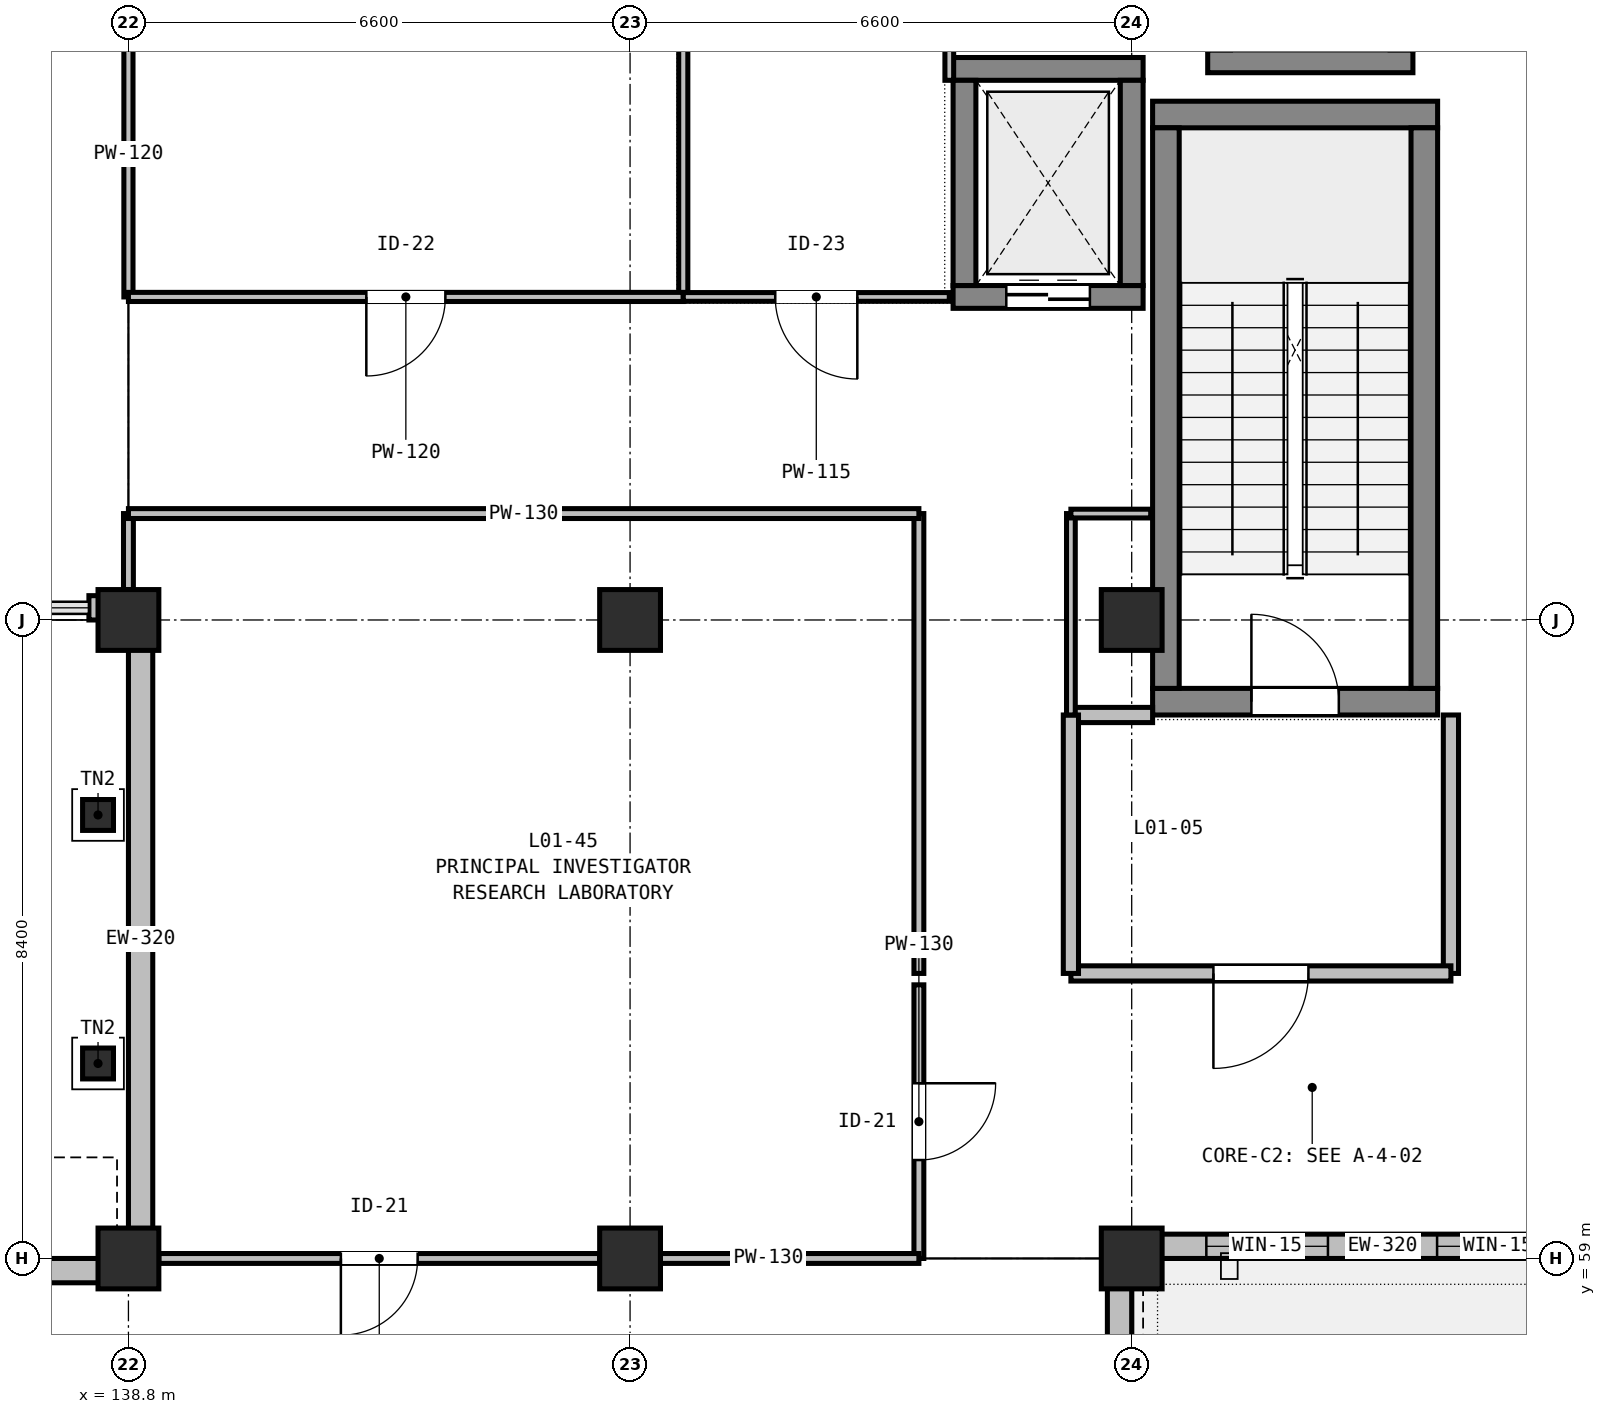
"""IFC4 building model, lengths in metres.
Left out: names, types, materials, properties, quantities, classifications, styles, units other than length and angle.
Written with IfcOpenShell. Run it as: python <this file> out.ifc"""

import sys

from ifc_helpers import new_model, si_unit, direction, frame, frame_2d, origin, origin_2d, place, context, subcontext, project, spatial, rectangle, hollow_circle, extrude, element, fill, save


model = new_model("IFC4")
c1 = context("Model", 3, precision=1e-05, world=origin(), true_north=direction((0.0, 1.0)))
c2 = subcontext(c1, "Body", "Model", "MODEL_VIEW")
j1 = project(units=[si_unit("LENGTHUNIT", "METRE"), si_unit("PLANEANGLEUNIT", "RADIAN")], contexts=[c1])
p1 = place(None, origin())
s1 = spatial("IfcSite", under=j1, at=p1, CompositionType="ELEMENT")
p2 = place(p1, origin())
s2 = spatial("IfcBuilding", under=s1, at=p2, CompositionType="ELEMENT")
p3 = place(p2, frame((0.0, 0.0, 5.4)))
s3 = spatial("IfcBuildingStorey", under=s2, at=p3, CompositionType="ELEMENT", Elevation=5.4)
for number, where, z_axis, x_axis in (
    (1, (138.8, 59.0, 0.0), (0.0, 0.0, 1.0), (1.0, 0.0, 0.0)),
    (2, (138.8, 67.4, 0.0), (0.0, 0.0, 1.0), (1.0, 0.0, 0.0)),
    (3, (145.4, 59.0, 0.0), (0.0, 0.0, 1.0), (1.0, 0.0, 0.0)),
    (4, (145.4, 67.4, 0.0), (0.0, 0.0, 1.0), (1.0, 0.0, 0.0)),
    (5, (152.0, 59.0, 0.0), (0.0, 0.0, 1.0), (1.0, 0.0, 0.0)),
    (6, (152.0, 67.4, 0.0), (0.0, 0.0, 1.0), (1.0, 0.0, 0.0)),
):
    element("IfcColumn", number, at=place(p3, frame(where, z_axis=z_axis, x_axis=x_axis)), inside=s3, PredefinedType="COLUMN", context=c2, shape_type="SweptSolid", body=[
        extrude(rectangle(XDim=0.8, YDim=0.8, at=origin_2d()), origin(), (0.0, 0.0, 1.0), 4.8),
    ])
p4 = place(p3, frame((152.275, 66.325, 0.0), z_axis=(0.0, 0.0, 1.0), x_axis=(1.0, 0.0, 0.0)))
e7 = element("IfcWall", 7, at=p4, inside=s3, PredefinedType="SHEAR", context=c2, shape_type="SweptSolid", body=[
    extrude(rectangle(XDim=3.75, YDim=0.35, at=frame_2d((1.875, 0.0))), origin(), (0.0, 0.0, 1.0), 4.8),
])
p5 = place(p4, frame((1.3, 0.0, 0.0)))
e8 = element("IfcOpeningElement", 8, at=p5, cuts=e7, PredefinedType="OPENING", context=c2, shape_type="SweptSolid", body=[
    extrude(rectangle(XDim=1.15, YDim=2.15, at=frame_2d((0.575, 1.075))), frame((0.0, 0.185, 0.0), z_axis=(0.0, -1.0, 0.0), x_axis=(1.0, 0.0, 0.0)), (0.0, 0.0, 1.0), 0.37),
])
p6 = place(p3, frame((152.275, 74.05, 0.0), z_axis=(0.0, 0.0, 1.0), x_axis=(1.0, 0.0, 0.0)))
e9 = element("IfcWall", 9, at=p6, inside=s3, PredefinedType="SHEAR", context=c2, shape_type="SweptSolid", body=[
    extrude(rectangle(XDim=3.75, YDim=0.35, at=frame_2d((1.875, 0.0))), origin(), (0.0, 0.0, 1.0), 4.8),
])
for number, where, z_axis, x_axis in (
    (10, (152.45, 66.5, 0.0), (0.0, 0.0, 1.0), (0.0, 1.0, 0.0)),
    (11, (155.85, 66.5, 0.0), (0.0, 0.0, 1.0), (0.0, 1.0, 0.0)),
):
    element("IfcWall", number, at=place(p3, frame(where, z_axis=z_axis, x_axis=x_axis)), inside=s3, PredefinedType="SHEAR", context=c2, shape_type="SweptSolid", body=[
        extrude(rectangle(XDim=7.375, YDim=0.35, at=frame_2d((3.688, 0.0))), origin(), (0.0, 0.0, 1.0), 4.8),
    ])
p7 = place(p3, frame((149.65, 71.65, 0.0), z_axis=(0.0, 0.0, 1.0), x_axis=(1.0, 0.0, 0.0)))
e12 = element("IfcWall", 12, at=p7, inside=s3, PredefinedType="SHEAR", context=c2, shape_type="SweptSolid", body=[
    extrude(rectangle(XDim=2.5, YDim=0.3, at=frame_2d((1.25, 0.0))), origin(), (0.0, 0.0, 1.0), 4.8),
])
p8 = place(p7, frame((0.7, 0.0, 0.0)))
e13 = element("IfcOpeningElement", 13, at=p8, cuts=e12, PredefinedType="OPENING", context=c2, shape_type="SweptSolid", body=[
    extrude(rectangle(XDim=1.1, YDim=2.1, at=frame_2d((0.55, 1.05))), frame((0.0, 0.16, 0.0), z_axis=(0.0, -1.0, 0.0), x_axis=(1.0, 0.0, 0.0)), (0.0, 0.0, 1.0), 0.32),
])
p9 = place(p3, frame((149.65, 74.65, 0.0), z_axis=(0.0, 0.0, 1.0), x_axis=(1.0, 0.0, 0.0)))
e14 = element("IfcWall", 14, at=p9, inside=s3, PredefinedType="SHEAR", context=c2, shape_type="SweptSolid", body=[
    extrude(rectangle(XDim=2.5, YDim=0.3, at=frame_2d((1.25, 0.0))), origin(), (0.0, 0.0, 1.0), 4.8),
])
for number, where, z_axis, x_axis in (
    (15, (149.8, 71.8, 0.0), (0.0, 0.0, 1.0), (0.0, 1.0, 0.0)),
    (16, (152.0, 71.8, 0.0), (0.0, 0.0, 1.0), (0.0, 1.0, 0.0)),
    (17, (153.0, 74.75, 0.0), (0.0, 0.0, 1.0), (1.0, 0.0, 0.0)),
):
    element("IfcWall", number, at=place(p3, frame(where, z_axis=z_axis, x_axis=x_axis)), inside=s3, PredefinedType="SHEAR", context=c2, shape_type="SweptSolid", body=[
        extrude(rectangle(XDim=2.7, YDim=0.3, at=frame_2d((1.35, 0.0))), origin(), (0.0, 0.0, 1.0), 4.8),
    ])
for number, where, z_axis, x_axis in (
    (18, (138.4, 61.565, 0.0), (0.0, 0.0, 1.0), (1.0, 0.0, 0.0)),
    (19, (138.4, 64.835, 0.0), (0.0, 0.0, 1.0), (1.0, 0.0, 0.0)),
):
    element("IfcColumn", number, at=place(p3, frame(where, z_axis=z_axis, x_axis=x_axis)), inside=s3, PredefinedType="COLUMN", context=c2, shape_type="SweptSolid", body=[
        extrude(hollow_circle(Radius=0.203, WallThickness=0.014, at=origin_2d()), origin(), (0.0, 0.0, 1.0), 4.8),
    ])
p10 = place(p3, frame((132.2, 58.84, 0.0), z_axis=(0.0, 0.0, 1.0), x_axis=(1.0, 0.0, 0.0)))
e20 = element("IfcWall", 20, at=p10, inside=s3, PredefinedType="STANDARD", context=c2, shape_type="SweptSolid", body=[
    extrude(rectangle(XDim=6.6, YDim=0.32, at=frame_2d((3.3, 0.0))), origin(), (0.0, 0.0, 1.0), 3.935),
])
p11 = place(p10, frame((1.307, 0.0, 0.9)))
e21 = element("IfcOpeningElement", 21, at=p11, cuts=e20, PredefinedType="OPENING", context=c2, shape_type="SweptSolid", body=[
    extrude(rectangle(XDim=0.95, YDim=1.8, at=frame_2d((0.475, 0.9))), frame((0.0, 0.17, 0.0), z_axis=(0.0, -1.0, 0.0), x_axis=(1.0, 0.0, 0.0)), (0.0, 0.0, 1.0), 0.34),
])
p12 = place(p10, frame((4.343, 0.0, 0.9)))
e22 = element("IfcOpeningElement", 22, at=p12, cuts=e20, PredefinedType="OPENING", context=c2, shape_type="SweptSolid", body=[
    extrude(rectangle(XDim=0.95, YDim=1.8, at=frame_2d((0.475, 0.9))), frame((0.0, 0.17, 0.0), z_axis=(0.0, -1.0, 0.0), x_axis=(1.0, 0.0, 0.0)), (0.0, 0.0, 1.0), 0.34),
])
p13 = place(p3, frame((138.96, 59.32, 0.0), z_axis=(0.0, 0.0, 1.0), x_axis=(0.0, 1.0, 0.0)))
e23 = element("IfcWall", 23, at=p13, inside=s3, PredefinedType="STANDARD", context=c2, shape_type="SweptSolid", body=[
    extrude(rectangle(XDim=7.76, YDim=0.32, at=frame_2d((3.88, 0.0))), origin(), (0.0, 0.0, 1.0), 4.085),
])
p14 = place(p3, frame((138.8, 67.56, 0.0), z_axis=(0.0, 0.0, 1.0), x_axis=(-1.0, 0.0, 0.0)))
e24 = element("IfcWall", 24, at=p14, inside=s3, PredefinedType="STANDARD", context=c2, shape_type="SweptSolid", body=[
    extrude(rectangle(XDim=0.52, YDim=0.32, at=frame_2d((0.26, 0.0))), origin(), (0.0, 0.0, 1.0), 3.935),
])
p15 = place(p3, frame((158.6, 59.16, 0.0), z_axis=(0.0, 0.0, 1.0), x_axis=(-1.0, 0.0, 0.0)))
e25 = element("IfcWall", 25, at=p15, inside=s3, PredefinedType="STANDARD", context=c2, shape_type="SweptSolid", body=[
    extrude(rectangle(XDim=6.6, YDim=0.32, at=frame_2d((3.3, 0.0))), origin(), (0.0, 0.0, 1.0), 3.935),
])
p16 = place(p15, frame((0.982, 0.0, 0.9)))
e26 = element("IfcOpeningElement", 26, at=p16, cuts=e25, PredefinedType="OPENING", context=c2, shape_type="SweptSolid", body=[
    extrude(rectangle(XDim=1.6, YDim=1.6, at=frame_2d((0.8, 0.8))), frame((0.0, 0.17, 0.0), z_axis=(0.0, -1.0, 0.0), x_axis=(1.0, 0.0, 0.0)), (0.0, 0.0, 1.0), 0.34),
])
p17 = place(p15, frame((4.018, 0.0, 0.9)))
e27 = element("IfcOpeningElement", 27, at=p17, cuts=e25, PredefinedType="OPENING", context=c2, shape_type="SweptSolid", body=[
    extrude(rectangle(XDim=1.6, YDim=1.6, at=frame_2d((0.8, 0.8))), frame((0.0, 0.17, 0.0), z_axis=(0.0, -1.0, 0.0), x_axis=(1.0, 0.0, 0.0)), (0.0, 0.0, 1.0), 0.34),
])
p18 = place(p3, frame((151.84, 58.68, 0.0), z_axis=(0.0, 0.0, 1.0), x_axis=(0.0, -1.0, 0.0)))
e28 = element("IfcWall", 28, at=p18, inside=s3, PredefinedType="STANDARD", context=c2, shape_type="SweptSolid", body=[
    extrude(rectangle(XDim=8.08, YDim=0.32, at=frame_2d((4.04, 0.0))), origin(), (0.0, 0.0, 1.0), 4.085),
])
p19 = place(p18, frame((3.12, 0.0, 0.9)))
e29 = element("IfcOpeningElement", 29, at=p19, cuts=e28, PredefinedType="OPENING", context=c2, shape_type="SweptSolid", body=[
    extrude(rectangle(XDim=1.85, YDim=1.6, at=frame_2d((0.925, 0.8))), frame((0.0, 0.17, 0.0), z_axis=(0.0, -1.0, 0.0), x_axis=(1.0, 0.0, 0.0)), (0.0, 0.0, 1.0), 0.34),
])
p20 = place(p3, frame((151.2, 66.15, 0.0), z_axis=(0.0, 0.0, 1.0), x_axis=(1.0, 0.0, 0.0)))
e30 = element("IfcWall", 30, at=p20, inside=s3, PredefinedType="PARTITIONING", context=c2, shape_type="SweptSolid", body=[
    extrude(rectangle(XDim=1.075, YDim=0.2, at=frame_2d((0.538, 0.0))), origin(), (0.0, 0.0, 1.0), 3.935),
])
p21 = place(p3, frame((156.2, 66.15, 0.0), z_axis=(0.0, 0.0, 1.0), x_axis=(0.0, -1.0, 0.0)))
e31 = element("IfcWall", 31, at=p21, inside=s3, PredefinedType="PARTITIONING", context=c2, shape_type="SweptSolid", body=[
    extrude(rectangle(XDim=3.4, YDim=0.2, at=frame_2d((1.7, 0.0))), origin(), (0.0, 0.0, 1.0), 4.445),
])
p22 = place(p3, frame((156.2, 62.75, 0.0), z_axis=(0.0, 0.0, 1.0), x_axis=(-1.0, 0.0, 0.0)))
e32 = element("IfcWall", 32, at=p22, inside=s3, PredefinedType="PARTITIONING", context=c2, shape_type="SweptSolid", body=[
    extrude(rectangle(XDim=5.0, YDim=0.2, at=frame_2d((2.5, 0.0))), origin(), (0.0, 0.0, 1.0), 3.935),
])
p23 = place(p22, frame((1.875, 0.0, 0.0)))
e33 = element("IfcOpeningElement", 33, at=p23, cuts=e32, PredefinedType="OPENING", context=c2, shape_type="SweptSolid", body=[
    extrude(rectangle(XDim=1.25, YDim=2.15, at=frame_2d((0.625, 1.075))), frame((0.0, 0.11, 0.0), z_axis=(0.0, -1.0, 0.0), x_axis=(1.0, 0.0, 0.0)), (0.0, 0.0, 1.0), 0.22),
])
p24 = place(p3, frame((151.2, 62.75, 0.0), z_axis=(0.0, 0.0, 1.0), x_axis=(0.0, 1.0, 0.0)))
e34 = element("IfcWall", 34, at=p24, inside=s3, PredefinedType="PARTITIONING", context=c2, shape_type="SweptSolid", body=[
    extrude(rectangle(XDim=3.4, YDim=0.2, at=frame_2d((1.7, 0.0))), origin(), (0.0, 0.0, 1.0), 4.445),
])
p25 = place(p3, frame((149.2, 68.8, 0.0), z_axis=(0.0, 0.0, 1.0), x_axis=(0.0, -1.0, 0.0)))
e35 = element("IfcWall", 35, at=p25, inside=s3, PredefinedType="PARTITIONING", context=c2, shape_type="SweptSolid", body=[
    extrude(rectangle(XDim=6.05, YDim=0.13, at=frame_2d((3.025, 0.0))), origin(), (0.0, 0.0, 1.0), 4.135),
])
p26 = place(p3, frame((149.2, 62.6, 0.0), z_axis=(0.0, 0.0, 1.0), x_axis=(0.0, -1.0, 0.0)))
e36 = element("IfcWall", 36, at=p26, inside=s3, PredefinedType="PARTITIONING", context=c2, shape_type="SweptSolid", body=[
    extrude(rectangle(XDim=3.6, YDim=0.13, at=frame_2d((1.8, 0.0))), origin(), (0.0, 0.0, 1.0), 4.135),
])
p27 = place(p26, frame((1.295, 0.0, 0.0)))
e37 = element("IfcOpeningElement", 37, at=p27, cuts=e36, PredefinedType="OPENING", context=c2, shape_type="SweptSolid", body=[
    extrude(rectangle(XDim=1.01, YDim=2.14, at=frame_2d((0.505, 1.07))), frame((0.0, 0.075, 0.0), z_axis=(0.0, -1.0, 0.0), x_axis=(1.0, 0.0, 0.0)), (0.0, 0.0, 1.0), 0.15),
])
p28 = place(p3, frame((149.2, 59.0, 0.0), z_axis=(0.0, 0.0, 1.0), x_axis=(-1.0, 0.0, 0.0)))
e38 = element("IfcWall", 38, at=p28, inside=s3, PredefinedType="PARTITIONING", context=c2, shape_type="SweptSolid", body=[
    extrude(rectangle(XDim=3.4, YDim=0.13, at=frame_2d((1.7, 0.0))), origin(), (0.0, 0.0, 1.0), 4.135),
])
p29 = place(p3, frame((145.0, 59.0, 0.0), z_axis=(0.0, 0.0, 1.0), x_axis=(-1.0, 0.0, 0.0)))
e39 = element("IfcWall", 39, at=p29, inside=s3, PredefinedType="PARTITIONING", context=c2, shape_type="SweptSolid", body=[
    extrude(rectangle(XDim=5.8, YDim=0.13, at=frame_2d((2.9, 0.0))), origin(), (0.0, 0.0, 1.0), 4.135),
])
p30 = place(p29, frame((2.395, 0.0, 0.0)))
e40 = element("IfcOpeningElement", 40, at=p30, cuts=e39, PredefinedType="OPENING", context=c2, shape_type="SweptSolid", body=[
    extrude(rectangle(XDim=1.01, YDim=2.14, at=frame_2d((0.505, 1.07))), frame((0.0, 0.075, 0.0), z_axis=(0.0, -1.0, 0.0), x_axis=(1.0, 0.0, 0.0)), (0.0, 0.0, 1.0), 0.15),
])
p31 = place(p3, frame((138.8, 67.8, 0.0), z_axis=(0.0, 0.0, 1.0), x_axis=(0.0, 1.0, 0.0)))
e41 = element("IfcWall", 41, at=p31, inside=s3, PredefinedType="PARTITIONING", context=c2, shape_type="SweptSolid", body=[
    extrude(rectangle(XDim=1.0, YDim=0.13, at=frame_2d((0.5, 0.0))), origin(), (0.0, 0.0, 1.0), 3.935),
])
p32 = place(p3, frame((138.8, 68.8, 0.0), z_axis=(0.0, 0.0, 1.0), x_axis=(1.0, 0.0, 0.0)))
e42 = element("IfcWall", 42, at=p32, inside=s3, PredefinedType="PARTITIONING", context=c2, shape_type="SweptSolid", body=[
    extrude(rectangle(XDim=10.4, YDim=0.13, at=frame_2d((5.2, 0.0))), origin(), (0.0, 0.0, 1.0), 3.935),
])
p33 = place(p3, frame((138.8, 71.65, 0.0), z_axis=(0.0, 0.0, 1.0), x_axis=(0.0, 1.0, 0.0)))
e43 = element("IfcWall", 43, at=p33, inside=s3, PredefinedType="PARTITIONING", context=c2, shape_type="SweptSolid", body=[
    extrude(rectangle(XDim=3.75, YDim=0.12, at=frame_2d((1.875, 0.0))), origin(), (0.0, 0.0, 1.0), 3.935),
])
p34 = place(p3, frame((146.1, 83.878, 0.0), z_axis=(0.0, 0.0, 1.0), x_axis=(0.0, -1.0, 0.0)))
e44 = element("IfcWall", 44, at=p34, inside=s3, PredefinedType="PARTITIONING", context=c2, shape_type="SweptSolid", body=[
    extrude(rectangle(XDim=12.228, YDim=0.12, at=frame_2d((6.114, 0.0))), origin(), (0.0, 0.0, 1.0), 4.085),
])
p35 = place(p3, frame((146.1, 71.65, 0.0), z_axis=(0.0, 0.0, 1.0), x_axis=(-1.0, 0.0, 0.0)))
e45 = element("IfcWall", 45, at=p35, inside=s3, PredefinedType="PARTITIONING", context=c2, shape_type="SweptSolid", body=[
    extrude(rectangle(XDim=7.3, YDim=0.12, at=frame_2d((3.65, 0.0))), origin(), (0.0, 0.0, 1.0), 3.935),
])
p36 = place(p35, frame((3.13, 0.0, 0.0)))
e46 = element("IfcOpeningElement", 46, at=p36, cuts=e45, PredefinedType="OPENING", context=c2, shape_type="SweptSolid", body=[
    extrude(rectangle(XDim=1.04, YDim=2.14, at=frame_2d((0.52, 1.07))), frame((0.0, 0.07, 0.0), z_axis=(0.0, -1.0, 0.0), x_axis=(1.0, 0.0, 0.0)), (0.0, 0.0, 1.0), 0.14),
])
p37 = place(p3, frame((149.6, 83.878, 0.0), z_axis=(0.0, 0.0, 1.0), x_axis=(0.0, -1.0, 0.0)))
e47 = element("IfcWall", 47, at=p37, inside=s3, PredefinedType="PARTITIONING", context=c2, shape_type="SweptSolid", body=[
    extrude(rectangle(XDim=9.378, YDim=0.115, at=frame_2d((4.689, 0.0))), origin(), (0.0, 0.0, 1.0), 4.085),
])
p38 = place(p37, frame((6.495, 0.0, 0.0)))
e48 = element("IfcOpeningElement", 48, at=p38, cuts=e47, PredefinedType="OPENING", context=c2, shape_type="SweptSolid", body=[
    extrude(rectangle(XDim=1.64, YDim=2.2, at=frame_2d((0.82, 1.1))), frame((0.0, 0.067, 0.0), z_axis=(0.0, -1.0, 0.0), x_axis=(1.0, 0.0, 0.0)), (0.0, 0.0, 1.0), 0.135),
])
p39 = place(p3, frame((149.6, 71.65, 0.0), z_axis=(0.0, 0.0, 1.0), x_axis=(-1.0, 0.0, 0.0)))
e49 = element("IfcWall", 49, at=p39, inside=s3, PredefinedType="PARTITIONING", context=c2, shape_type="SweptSolid", body=[
    extrude(rectangle(XDim=3.5, YDim=0.115, at=frame_2d((1.75, 0.0))), origin(), (0.0, 0.0, 1.0), 4.285),
])
p40 = place(p39, frame((1.21, 0.0, 0.0)))
e50 = element("IfcOpeningElement", 50, at=p40, cuts=e49, PredefinedType="OPENING", context=c2, shape_type="SweptSolid", body=[
    extrude(rectangle(XDim=1.08, YDim=2.14, at=frame_2d((0.54, 1.07))), frame((0.0, 0.067, 0.0), z_axis=(0.0, -1.0, 0.0), x_axis=(1.0, 0.0, 0.0)), (0.0, 0.0, 1.0), 0.135),
])
p41 = place(p3, frame((151.2, 66.15, 0.0), z_axis=(0.0, 0.0, 1.0), x_axis=(0.0, 1.0, 0.0)))
e51 = element("IfcWall", 51, at=p41, inside=s3, PredefinedType="PARTITIONING", context=c2, shape_type="SweptSolid", body=[
    extrude(rectangle(XDim=2.65, YDim=0.115, at=frame_2d((1.325, 0.0))), origin(), (0.0, 0.0, 1.0), 4.135),
])
p42 = place(p3, frame((151.2, 68.8, 0.0), z_axis=(0.0, 0.0, 1.0), x_axis=(1.0, 0.0, 0.0)))
e52 = element("IfcWall", 52, at=p42, inside=s3, PredefinedType="PARTITIONING", context=c2, shape_type="SweptSolid", body=[
    extrude(rectangle(XDim=1.05, YDim=0.115, at=frame_2d((0.525, 0.0))), origin(), (0.0, 0.0, 1.0), 3.935),
])
p43 = place(p16, origin())
e53 = element("IfcWindow", 53, at=p43, inside=s3, PartitioningType="SINGLE_PANEL", PredefinedType="WINDOW", context=c2, shape_type="SweptSolid", body=[
    extrude(rectangle(XDim=1.6, YDim=1.6, at=frame_2d((0.8, 0.8))), frame((0.0, 0.03, 0.0), z_axis=(0.0, -1.0, 0.0), x_axis=(1.0, 0.0, 0.0)), (0.0, 0.0, 1.0), 0.06),
])
fill(e26, e53)
p44 = place(p17, origin())
e54 = element("IfcWindow", 54, at=p44, inside=s3, PartitioningType="SINGLE_PANEL", PredefinedType="WINDOW", context=c2, shape_type="SweptSolid", body=[
    extrude(rectangle(XDim=1.6, YDim=1.6, at=frame_2d((0.8, 0.8))), frame((0.0, 0.03, 0.0), z_axis=(0.0, -1.0, 0.0), x_axis=(1.0, 0.0, 0.0)), (0.0, 0.0, 1.0), 0.06),
])
fill(e27, e54)
p45 = place(p5, origin())
e55 = element("IfcDoor", 55, at=p45, inside=s3, OperationType="SINGLE_SWING_LEFT", PredefinedType="DOOR", context=c2, shape_type="SweptSolid", body=[
    extrude(rectangle(XDim=1.15, YDim=2.15, at=frame_2d((0.575, 1.075))), frame((0.0, 0.025, 0.0), z_axis=(0.0, -1.0, 0.0), x_axis=(1.0, 0.0, 0.0)), (0.0, 0.0, 1.0), 0.05),
])
fill(e8, e55)
p46 = place(p8, origin())
e56 = element("IfcDoor", 56, at=p46, inside=s3, OperationType="DOUBLE_DOOR_SLIDING", PredefinedType="DOOR", context=c2, shape_type="SweptSolid", body=[
    extrude(rectangle(XDim=1.1, YDim=2.1, at=frame_2d((0.55, 1.05))), frame((0.0, 0.025, 0.0), z_axis=(0.0, -1.0, 0.0), x_axis=(1.0, 0.0, 0.0)), (0.0, 0.0, 1.0), 0.05),
])
fill(e13, e56)
p47 = place(p23, origin())
e57 = element("IfcDoor", 57, at=p47, inside=s3, OperationType="SINGLE_SWING_RIGHT", PredefinedType="DOOR", context=c2, shape_type="SweptSolid", body=[
    extrude(rectangle(XDim=1.25, YDim=2.15, at=frame_2d((0.625, 1.075))), frame((0.0, 0.025, 0.0), z_axis=(0.0, -1.0, 0.0), x_axis=(1.0, 0.0, 0.0)), (0.0, 0.0, 1.0), 0.05),
])
fill(e33, e57)
p48 = place(p30, origin())
e58 = element("IfcDoor", 58, at=p48, inside=s3, OperationType="SINGLE_SWING_RIGHT", PredefinedType="DOOR", context=c2, shape_type="SweptSolid", body=[
    extrude(rectangle(XDim=1.01, YDim=2.14, at=frame_2d((0.505, 1.07))), frame((0.0, 0.025, 0.0), z_axis=(0.0, -1.0, 0.0), x_axis=(1.0, 0.0, 0.0)), (0.0, 0.0, 1.0), 0.05),
])
fill(e40, e58)
p49 = place(p27, origin())
e59 = element("IfcDoor", 59, at=p49, inside=s3, OperationType="SINGLE_SWING_LEFT", PredefinedType="DOOR", context=c2, shape_type="SweptSolid", body=[
    extrude(rectangle(XDim=1.01, YDim=2.14, at=frame_2d((0.505, 1.07))), frame((0.0, 0.025, 0.0), z_axis=(0.0, -1.0, 0.0), x_axis=(1.0, 0.0, 0.0)), (0.0, 0.0, 1.0), 0.05),
])
fill(e37, e59)
p50 = place(p36, origin())
e60 = element("IfcDoor", 60, at=p50, inside=s3, OperationType="SINGLE_SWING_RIGHT", PredefinedType="DOOR", context=c2, shape_type="SweptSolid", body=[
    extrude(rectangle(XDim=1.04, YDim=2.14, at=frame_2d((0.52, 1.07))), frame((0.0, 0.025, 0.0), z_axis=(0.0, -1.0, 0.0), x_axis=(1.0, 0.0, 0.0)), (0.0, 0.0, 1.0), 0.05),
])
fill(e46, e60)
p51 = place(p40, origin())
e61 = element("IfcDoor", 61, at=p51, inside=s3, OperationType="SINGLE_SWING_LEFT", PredefinedType="DOOR", context=c2, shape_type="SweptSolid", body=[
    extrude(rectangle(XDim=1.08, YDim=2.14, at=frame_2d((0.54, 1.07))), frame((0.0, 0.025, 0.0), z_axis=(0.0, -1.0, 0.0), x_axis=(1.0, 0.0, 0.0)), (0.0, 0.0, 1.0), 0.05),
])
fill(e50, e61)
save(model, sys.argv[1])
